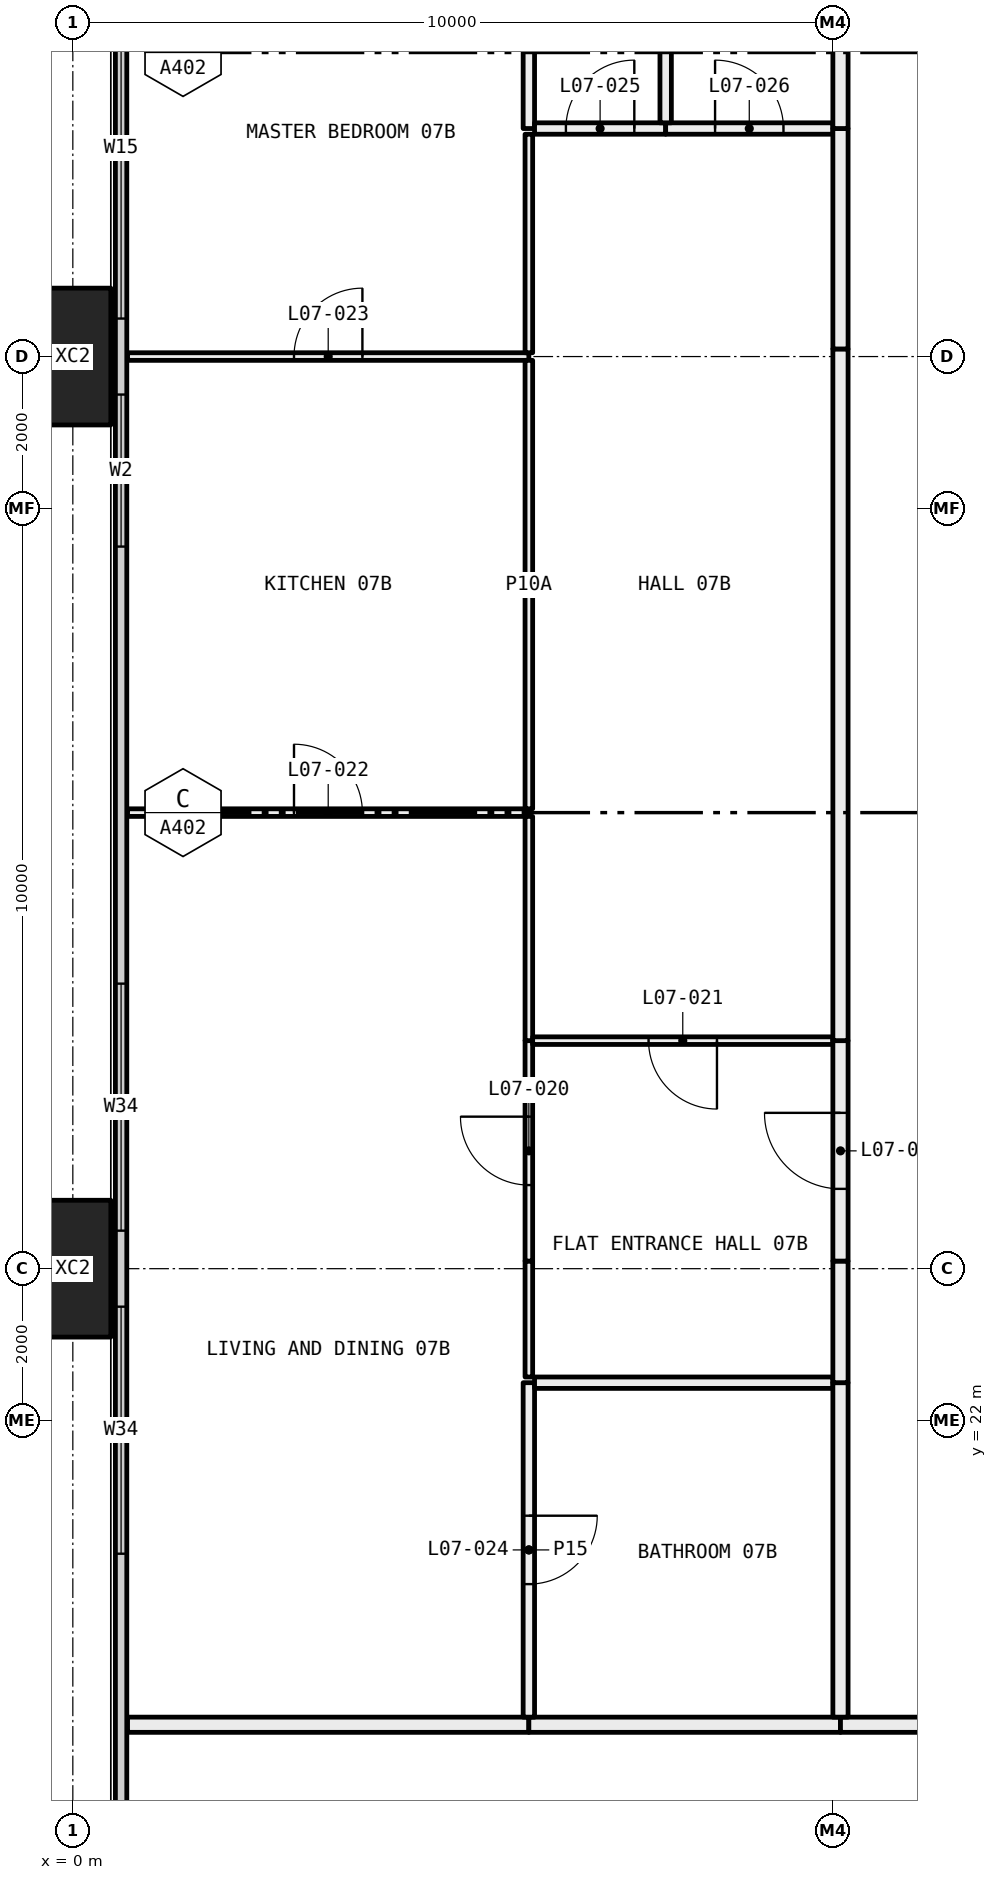
"""IFC4 building model, lengths in metres.
Left out: names, types, materials, properties, quantities, classifications, styles, units other than length and angle.
Written with IfcOpenShell. Run it as: python <this file> out.ifc"""

import sys

from ifc_helpers import new_model, si_unit, direction, frame, frame_2d, origin, origin_2d, place, context, subcontext, project, spatial, rectangle, hollow_rectangle, extrude, element, fill, save


model = new_model("IFC4")
c1 = context("Model", 3, precision=1e-05, world=origin(), true_north=direction((0.0, 1.0)))
c2 = subcontext(c1, "Body", "Model", "MODEL_VIEW")
j1 = project(units=[si_unit("LENGTHUNIT", "METRE"), si_unit("PLANEANGLEUNIT", "RADIAN")], contexts=[c1])
p1 = place(None, origin())
s1 = spatial("IfcSite", under=j1, at=p1, CompositionType="ELEMENT")
p2 = place(p1, origin())
s2 = spatial("IfcBuilding", under=s1, at=p2, CompositionType="ELEMENT")
p3 = place(p2, frame((0.0, 0.0, 36.9)))
s3 = spatial("IfcBuildingStorey", under=s2, at=p3, CompositionType="ELEMENT", Elevation=36.9)
for number, where, z_axis, x_axis in (
    (1, (0.0, 24.0, -0.4), (0.0, 0.0, 1.0), (0.0, 1.0, 0.0)),
    (2, (0.0, 36.0, -0.4), (0.0, 0.0, 1.0), (0.0, 1.0, 0.0)),
):
    element("IfcColumn", number, at=place(p3, frame(where, z_axis=z_axis, x_axis=x_axis)), inside=s3, PredefinedType="COLUMN", context=c2, shape_type="SweptSolid", body=[
        extrude(hollow_rectangle(XDim=1.8, YDim=1.0, WallThickness=0.07, at=origin_2d()), origin(), (0.0, 0.0, 1.0), 3.45),
    ])
p4 = place(p3, frame((0.635, 6.71, 0.0), z_axis=(0.0, 0.0, 1.0), x_axis=(0.0, 1.0, 0.0)))
e3 = element("IfcWall", 3, at=p4, inside=s3, PredefinedType="ELEMENTEDWALL", context=c2, shape_type="SweptSolid", body=[
    extrude(rectangle(XDim=34.58, YDim=0.15, at=frame_2d((17.29, 0.0))), origin(), (0.0, 0.0, 1.0), 3.05),
])
p5 = place(p4, frame((0.29, 0.0, 0.45)))
e4 = element("IfcOpeningElement", 4, at=p5, cuts=e3, PredefinedType="OPENING", context=c2, shape_type="SweptSolid", body=[
    extrude(rectangle(XDim=4.5, YDim=2.55, at=frame_2d((2.25, 1.275))), frame((0.0, 0.085, 0.0), z_axis=(0.0, -1.0, 0.0), x_axis=(1.0, 0.0, 0.0)), (0.0, 0.0, 1.0), 0.17),
])
p6 = place(p4, frame((5.79, 0.0, 0.45)))
e5 = element("IfcOpeningElement", 5, at=p6, cuts=e3, PredefinedType="OPENING", context=c2, shape_type="SweptSolid", body=[
    extrude(rectangle(XDim=3.25, YDim=2.55, at=frame_2d((1.625, 1.275))), frame((0.0, 0.085, 0.0), z_axis=(0.0, -1.0, 0.0), x_axis=(1.0, 0.0, 0.0)), (0.0, 0.0, 1.0), 0.17),
])
p7 = place(p4, frame((13.54, 0.0, 0.45)))
e6 = element("IfcOpeningElement", 6, at=p7, cuts=e3, PredefinedType="OPENING", context=c2, shape_type="SweptSolid", body=[
    extrude(rectangle(XDim=3.25, YDim=2.55, at=frame_2d((1.625, 1.275))), frame((0.0, 0.085, 0.0), z_axis=(0.0, -1.0, 0.0), x_axis=(1.0, 0.0, 0.0)), (0.0, 0.0, 1.0), 0.17),
])
p8 = place(p4, frame((17.79, 0.0, 0.45)))
e7 = element("IfcOpeningElement", 7, at=p8, cuts=e3, PredefinedType="OPENING", context=c2, shape_type="SweptSolid", body=[
    extrude(rectangle(XDim=3.25, YDim=2.55, at=frame_2d((1.625, 1.275))), frame((0.0, 0.085, 0.0), z_axis=(0.0, -1.0, 0.0), x_axis=(1.0, 0.0, 0.0)), (0.0, 0.0, 1.0), 0.17),
])
p9 = place(p4, frame((26.79, 0.0, 0.45)))
e8 = element("IfcOpeningElement", 8, at=p9, cuts=e3, PredefinedType="OPENING", context=c2, shape_type="SweptSolid", body=[
    extrude(rectangle(XDim=2.0, YDim=2.55, at=frame_2d((1.0, 1.275))), frame((0.0, 0.085, 0.0), z_axis=(0.0, -1.0, 0.0), x_axis=(1.0, 0.0, 0.0)), (0.0, 0.0, 1.0), 0.17),
])
p10 = place(p4, frame((29.79, 0.0, 0.45)))
e9 = element("IfcOpeningElement", 9, at=p10, cuts=e3, PredefinedType="OPENING", context=c2, shape_type="SweptSolid", body=[
    extrude(rectangle(XDim=4.5, YDim=2.55, at=frame_2d((2.25, 1.275))), frame((0.0, 0.085, 0.0), z_axis=(0.0, -1.0, 0.0), x_axis=(1.0, 0.0, 0.0)), (0.0, 0.0, 1.0), 0.17),
])
p11 = place(p3, frame((6.0, 18.0, 0.0), z_axis=(0.0, 0.0, 1.0), x_axis=(-1.0, 0.0, 0.0)))
e10 = element("IfcWall", 10, at=p11, inside=s3, PredefinedType="PARTITIONING", context=c2, shape_type="SweptSolid", body=[
    extrude(rectangle(XDim=5.28, YDim=0.2, at=frame_2d((2.64, 0.0))), origin(), (0.0, 0.0, 1.0), 3.05),
])
p12 = place(p3, frame((10.1, 18.0, 0.0), z_axis=(0.0, 0.0, 1.0), x_axis=(-1.0, 0.0, 0.0)))
e11 = element("IfcWall", 11, at=p12, inside=s3, PredefinedType="PARTITIONING", context=c2, shape_type="SweptSolid", body=[
    extrude(rectangle(XDim=4.1, YDim=0.2, at=frame_2d((2.05, 0.0))), origin(), (0.0, 0.0, 1.0), 3.05),
])
p13 = place(p3, frame((13.5, 18.0, 0.0), z_axis=(0.0, 0.0, 1.0), x_axis=(-1.0, 0.0, 0.0)))
e12 = element("IfcWall", 12, at=p13, inside=s3, PredefinedType="PARTITIONING", context=c2, shape_type="SweptSolid", body=[
    extrude(rectangle(XDim=3.4, YDim=0.2, at=frame_2d((1.7, 0.0))), origin(), (0.0, 0.0, 1.0), 3.05),
])
p14 = place(p3, frame((6.0, 30.0, 0.0), z_axis=(0.0, 0.0, 1.0), x_axis=(-1.0, 0.0, 0.0)))
e13 = element("IfcWall", 13, at=p14, inside=s3, PredefinedType="PARTITIONING", context=c2, shape_type="SweptSolid", body=[
    extrude(rectangle(XDim=5.28, YDim=0.1, at=frame_2d((2.64, 0.0))), origin(), (0.0, 0.0, 1.0), 3.05),
])
p15 = place(p14, frame((2.19, 0.0, 0.0)))
e14 = element("IfcOpeningElement", 14, at=p15, cuts=e13, PredefinedType="OPENING", context=c2, shape_type="SweptSolid", body=[
    extrude(rectangle(XDim=0.9, YDim=2.1, at=frame_2d((0.45, 1.05))), frame((0.0, 0.06, 0.0), z_axis=(0.0, -1.0, 0.0), x_axis=(1.0, 0.0, 0.0)), (0.0, 0.0, 1.0), 0.12),
])
p16 = place(p3, frame((6.0, 18.1, 0.0), z_axis=(0.0, 0.0, 1.0), x_axis=(0.0, 1.0, 0.0)))
e15 = element("IfcWall", 15, at=p16, inside=s3, PredefinedType="PARTITIONING", context=c2, shape_type="SweptSolid", body=[
    extrude(rectangle(XDim=4.4, YDim=0.15, at=frame_2d((2.2, 0.0))), origin(), (0.0, 0.0, 1.0), 3.05),
])
p17 = place(p16, frame((1.75, 0.0, 0.0)))
e16 = element("IfcOpeningElement", 16, at=p17, cuts=e15, PredefinedType="OPENING", context=c2, shape_type="SweptSolid", body=[
    extrude(rectangle(XDim=0.9, YDim=2.1, at=frame_2d((0.45, 1.05))), frame((0.0, 0.085, 0.0), z_axis=(0.0, -1.0, 0.0), x_axis=(1.0, 0.0, 0.0)), (0.0, 0.0, 1.0), 0.17),
])
p18 = place(p3, frame((6.0, 22.575, 0.0), z_axis=(0.0, 0.0, 1.0), x_axis=(0.0, 1.0, 0.0)))
e17 = element("IfcWall", 17, at=p18, inside=s3, PredefinedType="PARTITIONING", context=c2, shape_type="SweptSolid", body=[
    extrude(rectangle(XDim=1.525, YDim=0.1, at=frame_2d((0.763, 0.0))), origin(), (0.0, 0.0, 1.0), 2.45),
])
p19 = place(p3, frame((6.0, 24.1, 0.0), z_axis=(0.0, 0.0, 1.0), x_axis=(0.0, 1.0, 0.0)))
e18 = element("IfcWall", 18, at=p19, inside=s3, PredefinedType="PARTITIONING", context=c2, shape_type="SweptSolid", body=[
    extrude(rectangle(XDim=2.9, YDim=0.1, at=frame_2d((1.45, 0.0))), origin(), (0.0, 0.0, 1.0), 3.05),
])
p20 = place(p19, frame((1.0, 0.0, 0.0)))
e19 = element("IfcOpeningElement", 19, at=p20, cuts=e18, PredefinedType="OPENING", context=c2, shape_type="SweptSolid", body=[
    extrude(rectangle(XDim=0.9, YDim=2.1, at=frame_2d((0.45, 1.05))), frame((0.0, 0.06, 0.0), z_axis=(0.0, -1.0, 0.0), x_axis=(1.0, 0.0, 0.0)), (0.0, 0.0, 1.0), 0.12),
])
p21 = place(p3, frame((6.0, 27.0, 0.0), z_axis=(0.0, 0.0, 1.0), x_axis=(0.0, 1.0, 0.0)))
e20 = element("IfcWall", 20, at=p21, inside=s3, PredefinedType="PARTITIONING", context=c2, shape_type="SweptSolid", body=[
    extrude(rectangle(XDim=2.95, YDim=0.1, at=frame_2d((1.475, 0.0))), origin(), (0.0, 0.0, 1.0), 3.05),
])
p22 = place(p3, frame((6.0, 36.0, 0.0), z_axis=(0.0, 0.0, 1.0), x_axis=(-1.0, 0.0, 0.0)))
e21 = element("IfcWall", 21, at=p22, inside=s3, PredefinedType="PARTITIONING", context=c2, shape_type="SweptSolid", body=[
    extrude(rectangle(XDim=5.28, YDim=0.1, at=frame_2d((2.64, 0.0))), origin(), (0.0, 0.0, 1.0), 2.45),
])
p23 = place(p22, frame((2.19, 0.0, 0.0)))
e22 = element("IfcOpeningElement", 22, at=p23, cuts=e21, PredefinedType="OPENING", context=c2, shape_type="SweptSolid", body=[
    extrude(rectangle(XDim=0.9, YDim=2.1, at=frame_2d((0.45, 1.05))), frame((0.0, 0.06, 0.0), z_axis=(0.0, -1.0, 0.0), x_axis=(1.0, 0.0, 0.0)), (0.0, 0.0, 1.0), 0.12),
])
p24 = place(p3, frame((6.0, 30.05, 0.0), z_axis=(0.0, 0.0, 1.0), x_axis=(0.0, 1.0, 0.0)))
e23 = element("IfcWall", 23, at=p24, inside=s3, PredefinedType="PARTITIONING", context=c2, shape_type="SweptSolid", body=[
    extrude(rectangle(XDim=5.9, YDim=0.1, at=frame_2d((2.95, 0.0))), origin(), (0.0, 0.0, 1.0), 2.45),
])
p25 = place(p3, frame((6.0, 36.05, 0.0), z_axis=(0.0, 0.0, 1.0), x_axis=(0.0, 1.0, 0.0)))
e24 = element("IfcWall", 24, at=p25, inside=s3, PredefinedType="PARTITIONING", context=c2, shape_type="SweptSolid", body=[
    extrude(rectangle(XDim=2.875, YDim=0.1, at=frame_2d((1.438, 0.0))), origin(), (0.0, 0.0, 1.0), 2.45),
])
p26 = place(p3, frame((6.0, 39.0, 0.0), z_axis=(0.0, 0.0, 1.0), x_axis=(0.0, 1.0, 0.0)))
e25 = element("IfcWall", 25, at=p26, inside=s3, PredefinedType="PARTITIONING", context=c2, shape_type="SweptSolid", body=[
    extrude(rectangle(XDim=2.28, YDim=0.15, at=frame_2d((1.14, 0.0))), origin(), (0.0, 0.0, 1.0), 3.05),
])
p27 = place(p3, frame((10.0, 22.5, 0.0), z_axis=(0.0, 0.0, 1.0), x_axis=(-1.0, 0.0, 0.0)))
e26 = element("IfcWall", 26, at=p27, inside=s3, PredefinedType="PARTITIONING", context=c2, shape_type="SweptSolid", body=[
    extrude(rectangle(XDim=3.925, YDim=0.15, at=frame_2d((1.962, 0.0))), origin(), (0.0, 0.0, 1.0), 3.05),
])
p28 = place(p3, frame((10.1, 18.1, 0.0), z_axis=(0.0, 0.0, 1.0), x_axis=(0.0, 1.0, 0.0)))
e27 = element("IfcWall", 27, at=p28, inside=s3, PredefinedType="PARTITIONING", context=c2, shape_type="SweptSolid", body=[
    extrude(rectangle(XDim=4.4, YDim=0.2, at=frame_2d((2.2, 0.0))), origin(), (0.0, 0.0, 1.0), 3.05),
])
p29 = place(p3, frame((10.0, 27.0, 0.0), z_axis=(0.0, 0.0, 1.0), x_axis=(-1.0, 0.0, 0.0)))
e28 = element("IfcWall", 28, at=p29, inside=s3, PredefinedType="PARTITIONING", context=c2, shape_type="SweptSolid", body=[
    extrude(rectangle(XDim=3.95, YDim=0.1, at=frame_2d((1.975, 0.0))), origin(), (0.0, 0.0, 1.0), 3.05),
])
p30 = place(p29, frame((1.525, 0.0, 0.0)))
e29 = element("IfcOpeningElement", 29, at=p30, cuts=e28, PredefinedType="OPENING", context=c2, shape_type="SweptSolid", body=[
    extrude(rectangle(XDim=0.9, YDim=2.1, at=frame_2d((0.45, 1.05))), frame((0.0, 0.06, 0.0), z_axis=(0.0, -1.0, 0.0), x_axis=(1.0, 0.0, 0.0)), (0.0, 0.0, 1.0), 0.12),
])
p31 = place(p3, frame((10.1, 22.5, 0.0), z_axis=(0.0, 0.0, 1.0), x_axis=(0.0, 1.0, 0.0)))
e30 = element("IfcWall", 30, at=p31, inside=s3, PredefinedType="PARTITIONING", context=c2, shape_type="SweptSolid", body=[
    extrude(rectangle(XDim=1.6, YDim=0.2, at=frame_2d((0.8, 0.0))), origin(), (0.0, 0.0, 1.0), 2.45),
])
p32 = place(p3, frame((10.1, 24.1, 0.0), z_axis=(0.0, 0.0, 1.0), x_axis=(0.0, 1.0, 0.0)))
e31 = element("IfcWall", 31, at=p32, inside=s3, PredefinedType="PARTITIONING", context=c2, shape_type="SweptSolid", body=[
    extrude(rectangle(XDim=2.9, YDim=0.2, at=frame_2d((1.45, 0.0))), origin(), (0.0, 0.0, 1.0), 3.05),
])
p33 = place(p32, frame((0.95, 0.0, 0.0)))
e32 = element("IfcOpeningElement", 32, at=p33, cuts=e31, PredefinedType="OPENING", context=c2, shape_type="SweptSolid", body=[
    extrude(rectangle(XDim=1.0, YDim=2.1, at=frame_2d((0.5, 1.05))), frame((0.0, 0.11, 0.0), z_axis=(0.0, -1.0, 0.0), x_axis=(1.0, 0.0, 0.0)), (0.0, 0.0, 1.0), 0.22),
])
p34 = place(p3, frame((7.8, 39.0, 0.0), z_axis=(0.0, 0.0, 1.0), x_axis=(-1.0, 0.0, 0.0)))
e33 = element("IfcWall", 33, at=p34, inside=s3, PredefinedType="PARTITIONING", context=c2, shape_type="SweptSolid", body=[
    extrude(rectangle(XDim=1.725, YDim=0.15, at=frame_2d((0.863, 0.0))), origin(), (0.0, 0.0, 1.0), 3.05),
])
p35 = place(p34, frame((0.413, 0.0, 0.0)))
e34 = element("IfcOpeningElement", 34, at=p35, cuts=e33, PredefinedType="OPENING", context=c2, shape_type="SweptSolid", body=[
    extrude(rectangle(XDim=0.9, YDim=2.1, at=frame_2d((0.45, 1.05))), frame((0.0, 0.085, 0.0), z_axis=(0.0, -1.0, 0.0), x_axis=(1.0, 0.0, 0.0)), (0.0, 0.0, 1.0), 0.17),
])
p36 = place(p3, frame((10.0, 39.0, 0.0), z_axis=(0.0, 0.0, 1.0), x_axis=(-1.0, 0.0, 0.0)))
e35 = element("IfcWall", 35, at=p36, inside=s3, PredefinedType="PARTITIONING", context=c2, shape_type="SweptSolid", body=[
    extrude(rectangle(XDim=2.2, YDim=0.15, at=frame_2d((1.1, 0.0))), origin(), (0.0, 0.0, 1.0), 3.05),
])
p37 = place(p36, frame((0.65, 0.0, 0.0)))
e36 = element("IfcOpeningElement", 36, at=p37, cuts=e35, PredefinedType="OPENING", context=c2, shape_type="SweptSolid", body=[
    extrude(rectangle(XDim=0.9, YDim=2.1, at=frame_2d((0.45, 1.05))), frame((0.0, 0.085, 0.0), z_axis=(0.0, -1.0, 0.0), x_axis=(1.0, 0.0, 0.0)), (0.0, 0.0, 1.0), 0.17),
])
p38 = place(p3, frame((10.1, 27.0, 0.0), z_axis=(0.0, 0.0, 1.0), x_axis=(0.0, 1.0, 0.0)))
e37 = element("IfcWall", 37, at=p38, inside=s3, PredefinedType="PARTITIONING", context=c2, shape_type="SweptSolid", body=[
    extrude(rectangle(XDim=9.1, YDim=0.2, at=frame_2d((4.55, 0.0))), origin(), (0.0, 0.0, 1.0), 2.45),
])
p39 = place(p3, frame((10.1, 36.1, 0.0), z_axis=(0.0, 0.0, 1.0), x_axis=(0.0, 1.0, 0.0)))
e38 = element("IfcWall", 38, at=p39, inside=s3, PredefinedType="PARTITIONING", context=c2, shape_type="SweptSolid", body=[
    extrude(rectangle(XDim=2.9, YDim=0.2, at=frame_2d((1.45, 0.0))), origin(), (0.0, 0.0, 1.0), 3.05),
])
p40 = place(p3, frame((7.8, 39.075, 0.0), z_axis=(0.0, 0.0, 1.0), x_axis=(0.0, 1.0, 0.0)))
e39 = element("IfcWall", 39, at=p40, inside=s3, PredefinedType="PARTITIONING", context=c2, shape_type="SweptSolid", body=[
    extrude(rectangle(XDim=2.825, YDim=0.15, at=frame_2d((1.413, 0.0))), origin(), (0.0, 0.0, 1.0), 3.05),
])
p41 = place(p3, frame((10.1, 39.0, 0.0), z_axis=(0.0, 0.0, 1.0), x_axis=(0.0, 1.0, 0.0)))
e40 = element("IfcWall", 40, at=p41, inside=s3, PredefinedType="PARTITIONING", context=c2, shape_type="SweptSolid", body=[
    extrude(rectangle(XDim=2.9, YDim=0.2, at=frame_2d((1.45, 0.0))), origin(), (0.0, 0.0, 1.0), 3.05),
])
p42 = place(p7, origin())
e41 = element("IfcWindow", 41, at=p42, inside=s3, PartitioningType="SINGLE_PANEL", PredefinedType="WINDOW", context=c2, shape_type="SweptSolid", body=[
    extrude(rectangle(XDim=3.25, YDim=2.55, at=frame_2d((1.625, 1.275))), frame((0.0, 0.03, 0.0), z_axis=(0.0, -1.0, 0.0), x_axis=(1.0, 0.0, 0.0)), (0.0, 0.0, 1.0), 0.06),
])
fill(e6, e41)
p43 = place(p8, origin())
e42 = element("IfcWindow", 42, at=p43, inside=s3, PartitioningType="SINGLE_PANEL", PredefinedType="WINDOW", context=c2, shape_type="SweptSolid", body=[
    extrude(rectangle(XDim=3.25, YDim=2.55, at=frame_2d((1.625, 1.275))), frame((0.0, 0.03, 0.0), z_axis=(0.0, -1.0, 0.0), x_axis=(1.0, 0.0, 0.0)), (0.0, 0.0, 1.0), 0.06),
])
fill(e7, e42)
p44 = place(p9, origin())
e43 = element("IfcWindow", 43, at=p44, inside=s3, PartitioningType="SINGLE_PANEL", PredefinedType="WINDOW", context=c2, shape_type="SweptSolid", body=[
    extrude(rectangle(XDim=2.0, YDim=2.55, at=frame_2d((1.0, 1.275))), frame((0.0, 0.03, 0.0), z_axis=(0.0, -1.0, 0.0), x_axis=(1.0, 0.0, 0.0)), (0.0, 0.0, 1.0), 0.06),
])
fill(e8, e43)
p45 = place(p10, origin())
e44 = element("IfcWindow", 44, at=p45, inside=s3, PartitioningType="SINGLE_PANEL", PredefinedType="WINDOW", context=c2, shape_type="SweptSolid", body=[
    extrude(rectangle(XDim=4.5, YDim=2.55, at=frame_2d((2.25, 1.275))), frame((0.0, 0.03, 0.0), z_axis=(0.0, -1.0, 0.0), x_axis=(1.0, 0.0, 0.0)), (0.0, 0.0, 1.0), 0.06),
])
fill(e9, e44)
p46 = place(p33, origin())
e45 = element("IfcDoor", 45, at=p46, inside=s3, OperationType="SINGLE_SWING_LEFT", PredefinedType="DOOR", context=c2, shape_type="SweptSolid", body=[
    extrude(rectangle(XDim=1.0, YDim=2.1, at=frame_2d((0.5, 1.05))), frame((0.0, 0.025, 0.0), z_axis=(0.0, -1.0, 0.0), x_axis=(1.0, 0.0, 0.0)), (0.0, 0.0, 1.0), 0.05),
])
fill(e32, e45)
p47 = place(p20, origin())
e46 = element("IfcDoor", 46, at=p47, inside=s3, OperationType="SINGLE_SWING_LEFT", PredefinedType="DOOR", context=c2, shape_type="SweptSolid", body=[
    extrude(rectangle(XDim=0.9, YDim=2.1, at=frame_2d((0.45, 1.05))), frame((0.0, 0.025, 0.0), z_axis=(0.0, -1.0, 0.0), x_axis=(1.0, 0.0, 0.0)), (0.0, 0.0, 1.0), 0.05),
])
fill(e19, e46)
p48 = place(p30, origin())
e47 = element("IfcDoor", 47, at=p48, inside=s3, OperationType="SINGLE_SWING_RIGHT", PredefinedType="DOOR", context=c2, shape_type="SweptSolid", body=[
    extrude(rectangle(XDim=0.9, YDim=2.1, at=frame_2d((0.45, 1.05))), frame((0.0, 0.025, 0.0), z_axis=(0.0, -1.0, 0.0), x_axis=(1.0, 0.0, 0.0)), (0.0, 0.0, 1.0), 0.05),
])
fill(e29, e47)
p49 = place(p15, frame((0.9, 0.0, 0.0), x_axis=(-1.0, 0.0, 0.0)))
e48 = element("IfcDoor", 48, at=p49, inside=s3, OperationType="SINGLE_SWING_RIGHT", PredefinedType="DOOR", context=c2, shape_type="SweptSolid", body=[
    extrude(rectangle(XDim=0.9, YDim=2.1, at=frame_2d((0.45, 1.05))), frame((0.0, 0.025, 0.0), z_axis=(0.0, -1.0, 0.0), x_axis=(1.0, 0.0, 0.0)), (0.0, 0.0, 1.0), 0.05),
])
fill(e14, e48)
p50 = place(p23, frame((0.9, 0.0, 0.0), x_axis=(-1.0, 0.0, 0.0)))
e49 = element("IfcDoor", 49, at=p50, inside=s3, OperationType="SINGLE_SWING_LEFT", PredefinedType="DOOR", context=c2, shape_type="SweptSolid", body=[
    extrude(rectangle(XDim=0.9, YDim=2.1, at=frame_2d((0.45, 1.05))), frame((0.0, 0.025, 0.0), z_axis=(0.0, -1.0, 0.0), x_axis=(1.0, 0.0, 0.0)), (0.0, 0.0, 1.0), 0.05),
])
fill(e22, e49)
p51 = place(p17, frame((0.9, 0.0, 0.0), x_axis=(-1.0, 0.0, 0.0)))
e50 = element("IfcDoor", 50, at=p51, inside=s3, OperationType="SINGLE_SWING_RIGHT", PredefinedType="DOOR", context=c2, shape_type="SweptSolid", body=[
    extrude(rectangle(XDim=0.9, YDim=2.1, at=frame_2d((0.45, 1.05))), frame((0.0, 0.025, 0.0), z_axis=(0.0, -1.0, 0.0), x_axis=(1.0, 0.0, 0.0)), (0.0, 0.0, 1.0), 0.05),
])
fill(e16, e50)
p52 = place(p35, frame((0.9, 0.0, 0.0), x_axis=(-1.0, 0.0, 0.0)))
e51 = element("IfcDoor", 51, at=p52, inside=s3, OperationType="SINGLE_SWING_LEFT", PredefinedType="DOOR", context=c2, shape_type="SweptSolid", body=[
    extrude(rectangle(XDim=0.9, YDim=2.1, at=frame_2d((0.45, 1.05))), frame((0.0, 0.025, 0.0), z_axis=(0.0, -1.0, 0.0), x_axis=(1.0, 0.0, 0.0)), (0.0, 0.0, 1.0), 0.05),
])
fill(e34, e51)
p53 = place(p37, frame((0.9, 0.0, 0.0), x_axis=(-1.0, 0.0, 0.0)))
e52 = element("IfcDoor", 52, at=p53, inside=s3, OperationType="SINGLE_SWING_RIGHT", PredefinedType="DOOR", context=c2, shape_type="SweptSolid", body=[
    extrude(rectangle(XDim=0.9, YDim=2.1, at=frame_2d((0.45, 1.05))), frame((0.0, 0.025, 0.0), z_axis=(0.0, -1.0, 0.0), x_axis=(1.0, 0.0, 0.0)), (0.0, 0.0, 1.0), 0.05),
])
fill(e36, e52)
save(model, sys.argv[1])
